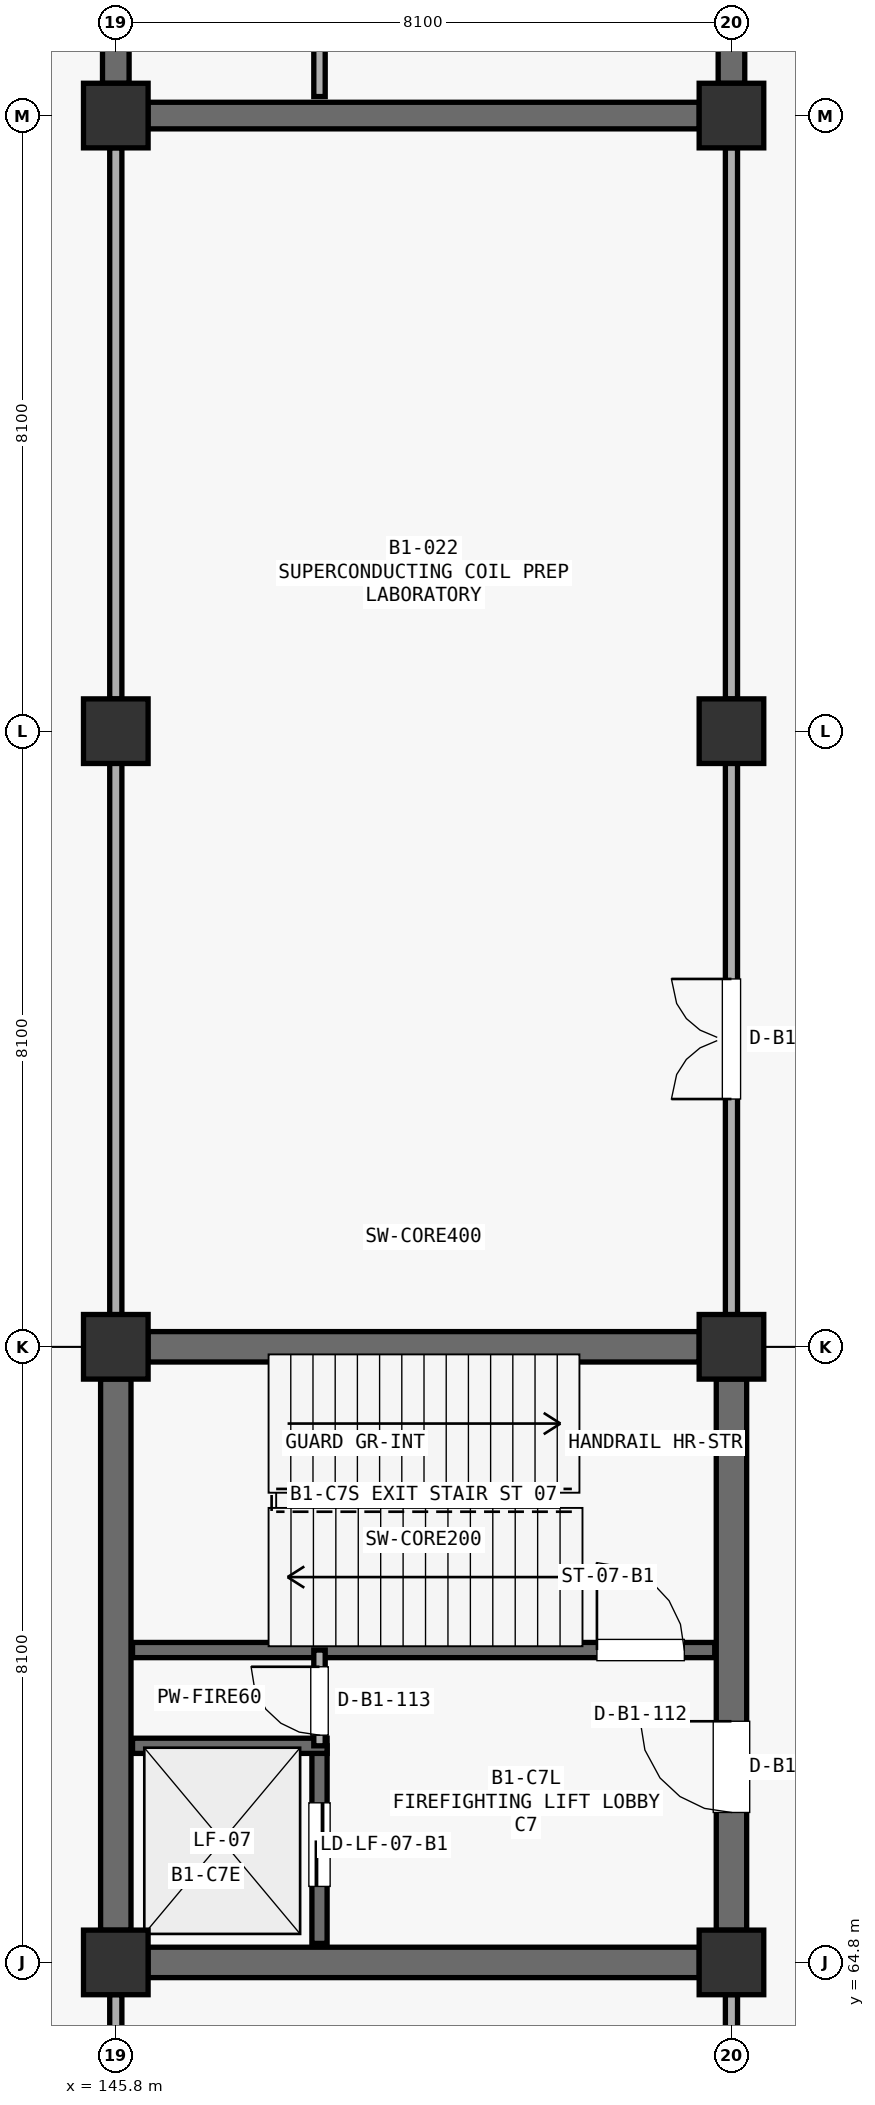
"""IFC4 building model, lengths in metres.
Left out: names, types, materials, properties, quantities, classifications, styles, units other than length and angle.
Written with IfcOpenShell. Run it as: python <this file> out.ifc"""

import sys

from ifc_helpers import new_model, si_unit, direction, frame, frame_2d, origin, origin_2d, place, context, subcontext, project, spatial, rectangle, extrude, element, fill, save


model = new_model("IFC4")
c1 = context("Model", 3, precision=1e-05, world=origin(), true_north=direction((0.0, 1.0)))
c2 = subcontext(c1, "Body", "Model", "MODEL_VIEW")
j1 = project(units=[si_unit("LENGTHUNIT", "METRE"), si_unit("PLANEANGLEUNIT", "RADIAN")], contexts=[c1])
p1 = place(None, origin())
s1 = spatial("IfcSite", under=j1, at=p1, CompositionType="ELEMENT")
p2 = place(p1, origin())
s2 = spatial("IfcBuilding", under=s1, at=p2, CompositionType="ELEMENT")
p3 = place(p2, frame((0.0, 0.0, -5.1)))
s3 = spatial("IfcBuildingStorey", under=s2, at=p3, CompositionType="ELEMENT", Elevation=-5.1)
for number, where, z_axis, x_axis in (
    (1, (145.8, 64.8, 0.0), (0.0, 0.0, 1.0), (1.0, 0.0, 0.0)),
    (2, (145.8, 72.9, 0.0), (0.0, 0.0, 1.0), (1.0, 0.0, 0.0)),
    (3, (145.8, 81.0, 0.0), (0.0, 0.0, 1.0), (1.0, 0.0, 0.0)),
    (4, (145.8, 89.1, 0.0), (0.0, 0.0, 1.0), (1.0, 0.0, 0.0)),
    (5, (153.9, 64.8, 0.0), (0.0, 0.0, 1.0), (1.0, 0.0, 0.0)),
    (6, (153.9, 72.9, 0.0), (0.0, 0.0, 1.0), (1.0, 0.0, 0.0)),
    (7, (153.9, 81.0, 0.0), (0.0, 0.0, 1.0), (1.0, 0.0, 0.0)),
    (8, (153.9, 89.1, 0.0), (0.0, 0.0, 1.0), (1.0, 0.0, 0.0)),
):
    element("IfcColumn", number, at=place(p3, frame(where, z_axis=z_axis, x_axis=x_axis)), inside=s3, PredefinedType="COLUMN", context=c2, shape_type="SweptSolid", body=[
        extrude(rectangle(XDim=0.85, YDim=0.85, at=origin_2d()), origin(), (0.0, 0.0, 1.0), 5.1),
    ])
for number, where, z_axis, x_axis in (
    (9, (146.223, 72.9, 0.0), (0.0, 0.0, 1.0), (1.0, 0.0, 0.0)),
    (10, (145.8, 65.223, 0.0), (0.0, 0.0, 1.0), (0.0, 1.0, 0.0)),
):
    element("IfcWall", number, at=place(p3, frame(where, z_axis=z_axis, x_axis=x_axis)), inside=s3, PredefinedType="SHEAR", context=c2, shape_type="SweptSolid", body=[
        extrude(rectangle(XDim=7.254, YDim=0.4, at=frame_2d((3.627, 0.0))), origin(), (0.0, 0.0, 1.0), 4.782),
    ])
p4 = place(p3, frame((153.9, 65.223, 0.0), z_axis=(0.0, 0.0, 1.0), x_axis=(0.0, 1.0, 0.0)))
e11 = element("IfcWall", 11, at=p4, inside=s3, PredefinedType="SHEAR", context=c2, shape_type="SweptSolid", body=[
    extrude(rectangle(XDim=7.254, YDim=0.4, at=frame_2d((3.627, 0.0))), origin(), (0.0, 0.0, 1.0), 4.782),
])
p5 = place(p4, frame((1.55, 0.0, 0.0)))
e12 = element("IfcOpeningElement", 12, at=p5, cuts=e11, PredefinedType="OPENING", context=c2, shape_type="SweptSolid", body=[
    extrude(rectangle(XDim=1.2, YDim=2.2, at=frame_2d((0.6, 1.1))), frame((0.0, 0.21, 0.0), z_axis=(0.0, -1.0, 0.0), x_axis=(1.0, 0.0, 0.0)), (0.0, 0.0, 1.0), 0.42),
])
p6 = place(p3, frame((146.223, 64.8, 0.0), z_axis=(0.0, 0.0, 1.0), x_axis=(1.0, 0.0, 0.0)))
e13 = element("IfcWall", 13, at=p6, inside=s3, PredefinedType="SHEAR", context=c2, shape_type="SweptSolid", body=[
    extrude(rectangle(XDim=7.254, YDim=0.4, at=frame_2d((3.627, 0.0))), origin(), (0.0, 0.0, 1.0), 4.782),
])
p7 = place(p3, frame((146.02, 68.91, 0.0), z_axis=(0.0, 0.0, 1.0), x_axis=(1.0, 0.0, 0.0)))
e14 = element("IfcWall", 14, at=p7, inside=s3, PredefinedType="SHEAR", context=c2, shape_type="SweptSolid", body=[
    extrude(rectangle(XDim=7.66, YDim=0.2, at=frame_2d((3.83, 0.0))), origin(), (0.0, 0.0, 1.0), 4.782),
])
p8 = place(p7, frame((6.11, 0.0, 0.0)))
e15 = element("IfcOpeningElement", 15, at=p8, cuts=e14, PredefinedType="OPENING", context=c2, shape_type="SweptSolid", body=[
    extrude(rectangle(XDim=1.15, YDim=2.2, at=frame_2d((0.575, 1.1))), frame((0.0, 0.11, 0.0), z_axis=(0.0, -1.0, 0.0), x_axis=(1.0, 0.0, 0.0)), (0.0, 0.0, 1.0), 0.22),
])
p9 = place(p3, frame((148.48, 65.05, 0.0), z_axis=(0.0, 0.0, 1.0), x_axis=(0.0, 1.0, 0.0)))
e16 = element("IfcWall", 16, at=p9, inside=s3, PredefinedType="SHEAR", context=c2, shape_type="SweptSolid", body=[
    extrude(rectangle(XDim=2.6, YDim=0.2, at=frame_2d((1.3, 0.0))), origin(), (0.0, 0.0, 1.0), 4.782),
])
p10 = place(p9, frame((0.75, 0.0, 0.0)))
e17 = element("IfcOpeningElement", 17, at=p10, cuts=e16, PredefinedType="OPENING", context=c2, shape_type="SweptSolid", body=[
    extrude(rectangle(XDim=1.1, YDim=2.2, at=frame_2d((0.55, 1.1))), frame((0.0, 0.11, 0.0), z_axis=(0.0, -1.0, 0.0), x_axis=(1.0, 0.0, 0.0)), (0.0, 0.0, 1.0), 0.22),
])
p11 = place(p3, frame((146.02, 67.65, 0.0), z_axis=(0.0, 0.0, 1.0), x_axis=(1.0, 0.0, 0.0)))
e18 = element("IfcWall", 18, at=p11, inside=s3, PredefinedType="SHEAR", context=c2, shape_type="SweptSolid", body=[
    extrude(rectangle(XDim=2.56, YDim=0.2, at=frame_2d((1.28, 0.0))), origin(), (0.0, 0.0, 1.0), 4.782),
])
p12 = place(p3, frame((148.48, 67.65, 0.0), z_axis=(0.0, 0.0, 1.0), x_axis=(0.0, 1.0, 0.0)))
e19 = element("IfcWall", 19, at=p12, inside=s3, PredefinedType="PARTITIONING", context=c2, shape_type="SweptSolid", body=[
    extrude(rectangle(XDim=1.26, YDim=0.15, at=frame_2d((0.63, 0.0))), origin(), (0.0, 0.0, 1.0), 4.782),
])
p13 = place(p12, frame((0.14, 0.0, 0.0)))
e20 = element("IfcOpeningElement", 20, at=p13, cuts=e19, PredefinedType="OPENING", context=c2, shape_type="SweptSolid", body=[
    extrude(rectangle(XDim=0.9, YDim=2.15, at=frame_2d((0.45, 1.075))), frame((0.0, 0.085, 0.0), z_axis=(0.0, -1.0, 0.0), x_axis=(1.0, 0.0, 0.0)), (0.0, 0.0, 1.0), 0.17),
])
p14 = place(p3, frame((145.8, 89.523, 0.0), z_axis=(0.0, 0.0, 1.0), x_axis=(0.0, 1.0, 0.0)))
e21 = element("IfcWall", 21, at=p14, inside=s3, PredefinedType="SHEAR", context=c2, shape_type="SweptSolid", body=[
    extrude(rectangle(XDim=7.254, YDim=0.35, at=frame_2d((3.627, 0.0))), origin(), (0.0, 0.0, 1.0), 4.782),
])
p15 = place(p3, frame((153.9, 89.523, 0.0), z_axis=(0.0, 0.0, 1.0), x_axis=(0.0, 1.0, 0.0)))
e22 = element("IfcWall", 22, at=p15, inside=s3, PredefinedType="SHEAR", context=c2, shape_type="SweptSolid", body=[
    extrude(rectangle(XDim=7.254, YDim=0.35, at=frame_2d((3.627, 0.0))), origin(), (0.0, 0.0, 1.0), 4.782),
])
p16 = place(p15, frame((1.55, 0.0, 0.0)))
e23 = element("IfcOpeningElement", 23, at=p16, cuts=e22, PredefinedType="OPENING", context=c2, shape_type="SweptSolid", body=[
    extrude(rectangle(XDim=1.2, YDim=2.2, at=frame_2d((0.6, 1.1))), frame((0.0, 0.185, 0.0), z_axis=(0.0, -1.0, 0.0), x_axis=(1.0, 0.0, 0.0)), (0.0, 0.0, 1.0), 0.37),
])
p17 = place(p3, frame((146.223, 89.1, 0.0), z_axis=(0.0, 0.0, 1.0), x_axis=(1.0, 0.0, 0.0)))
e24 = element("IfcWall", 24, at=p17, inside=s3, PredefinedType="SHEAR", context=c2, shape_type="SweptSolid", body=[
    extrude(rectangle(XDim=7.254, YDim=0.35, at=frame_2d((3.627, 0.0))), origin(), (0.0, 0.0, 1.0), 4.782),
])
p18 = place(p3, frame((148.48, 89.35, 0.0), z_axis=(0.0, 0.0, 1.0), x_axis=(0.0, 1.0, 0.0)))
e25 = element("IfcWall", 25, at=p18, inside=s3, PredefinedType="PARTITIONING", context=c2, shape_type="SweptSolid", body=[
    extrude(rectangle(XDim=2.6, YDim=0.15, at=frame_2d((1.3, 0.0))), origin(), (0.0, 0.0, 1.0), 4.782),
])
p19 = place(p18, frame((0.8, 0.0, 0.0)))
e26 = element("IfcOpeningElement", 26, at=p19, cuts=e25, PredefinedType="OPENING", context=c2, shape_type="SweptSolid", body=[
    extrude(rectangle(XDim=0.95, YDim=2.15, at=frame_2d((0.475, 1.075))), frame((0.0, 0.085, 0.0), z_axis=(0.0, -1.0, 0.0), x_axis=(1.0, 0.0, 0.0)), (0.0, 0.0, 1.0), 0.17),
])
p20 = place(p3, frame((145.8, 57.123, 0.0), z_axis=(0.0, 0.0, 1.0), x_axis=(0.0, 1.0, 0.0)))
e27 = element("IfcWall", 27, at=p20, inside=s3, PredefinedType="PARTITIONING", context=c2, shape_type="SweptSolid", body=[
    extrude(rectangle(XDim=7.254, YDim=0.16, at=frame_2d((3.627, 0.0))), origin(), (0.0, 0.0, 1.0), 3.932),
])
p21 = place(p20, frame((2.917, 0.0, 0.0)))
e28 = element("IfcOpeningElement", 28, at=p21, cuts=e27, PredefinedType="OPENING", context=c2, shape_type="SweptSolid", body=[
    extrude(rectangle(XDim=1.42, YDim=2.25, at=frame_2d((0.71, 1.125))), frame((0.0, 0.09, 0.0), z_axis=(0.0, -1.0, 0.0), x_axis=(1.0, 0.0, 0.0)), (0.0, 0.0, 1.0), 0.18),
])
p22 = place(p3, frame((145.8, 73.323, 0.0), z_axis=(0.0, 0.0, 1.0), x_axis=(0.0, 1.0, 0.0)))
e29 = element("IfcWall", 29, at=p22, inside=s3, PredefinedType="PARTITIONING", context=c2, shape_type="SweptSolid", body=[
    extrude(rectangle(XDim=7.254, YDim=0.16, at=frame_2d((3.627, 0.0))), origin(), (0.0, 0.0, 1.0), 4.032),
])
p23 = place(p3, frame((145.8, 81.423, 0.0), z_axis=(0.0, 0.0, 1.0), x_axis=(0.0, 1.0, 0.0)))
e30 = element("IfcWall", 30, at=p23, inside=s3, PredefinedType="PARTITIONING", context=c2, shape_type="SweptSolid", body=[
    extrude(rectangle(XDim=7.254, YDim=0.16, at=frame_2d((3.627, 0.0))), origin(), (0.0, 0.0, 1.0), 4.132),
])
p24 = place(p3, frame((153.9, 73.323, 0.0), z_axis=(0.0, 0.0, 1.0), x_axis=(0.0, 1.0, 0.0)))
e31 = element("IfcWall", 31, at=p24, inside=s3, PredefinedType="PARTITIONING", context=c2, shape_type="SweptSolid", body=[
    extrude(rectangle(XDim=7.254, YDim=0.16, at=frame_2d((3.627, 0.0))), origin(), (0.0, 0.0, 1.0), 4.182),
])
p25 = place(p24, frame((2.837, 0.0, 0.0)))
e32 = element("IfcOpeningElement", 32, at=p25, cuts=e31, PredefinedType="OPENING", context=c2, shape_type="SweptSolid", body=[
    extrude(rectangle(XDim=1.58, YDim=2.2, at=frame_2d((0.79, 1.1))), frame((0.0, 0.09, 0.0), z_axis=(0.0, -1.0, 0.0), x_axis=(1.0, 0.0, 0.0)), (0.0, 0.0, 1.0), 0.18),
])
p26 = place(p3, frame((153.9, 81.423, 0.0), z_axis=(0.0, 0.0, 1.0), x_axis=(0.0, 1.0, 0.0)))
e33 = element("IfcWall", 33, at=p26, inside=s3, PredefinedType="PARTITIONING", context=c2, shape_type="SweptSolid", body=[
    extrude(rectangle(XDim=7.254, YDim=0.16, at=frame_2d((3.627, 0.0))), origin(), (0.0, 0.0, 1.0), 3.932),
])
p27 = place(p3, frame((153.9, 57.123, 0.0), z_axis=(0.0, 0.0, 1.0), x_axis=(0.0, 1.0, 0.0)))
e34 = element("IfcWall", 34, at=p27, inside=s3, PredefinedType="PARTITIONING", context=c2, shape_type="SweptSolid", body=[
    extrude(rectangle(XDim=7.254, YDim=0.16, at=frame_2d((3.627, 0.0))), origin(), (0.0, 0.0, 1.0), 4.032),
])
p28 = place(p27, frame((2.877, 0.0, 0.0)))
e35 = element("IfcOpeningElement", 35, at=p28, cuts=e34, PredefinedType="OPENING", context=c2, shape_type="SweptSolid", body=[
    extrude(rectangle(XDim=1.5, YDim=2.2, at=frame_2d((0.75, 1.1))), frame((0.0, 0.09, 0.0), z_axis=(0.0, -1.0, 0.0), x_axis=(1.0, 0.0, 0.0)), (0.0, 0.0, 1.0), 0.18),
])
p29 = place(p5, origin())
e36 = element("IfcDoor", 36, at=p29, inside=s3, OperationType="SINGLE_SWING_RIGHT", PredefinedType="DOOR", context=c2, shape_type="SweptSolid", body=[
    extrude(rectangle(XDim=1.2, YDim=2.2, at=frame_2d((0.6, 1.1))), frame((0.0, 0.025, 0.0), z_axis=(0.0, -1.0, 0.0), x_axis=(1.0, 0.0, 0.0)), (0.0, 0.0, 1.0), 0.05),
])
fill(e12, e36)
p30 = place(p8, origin())
e37 = element("IfcDoor", 37, at=p30, inside=s3, OperationType="SINGLE_SWING_LEFT", PredefinedType="DOOR", context=c2, shape_type="SweptSolid", body=[
    extrude(rectangle(XDim=1.15, YDim=2.2, at=frame_2d((0.575, 1.1))), frame((0.0, 0.025, 0.0), z_axis=(0.0, -1.0, 0.0), x_axis=(1.0, 0.0, 0.0)), (0.0, 0.0, 1.0), 0.05),
])
fill(e15, e37)
p31 = place(p10, origin())
e38 = element("IfcDoor", 38, at=p31, inside=s3, OperationType="SLIDING_TO_LEFT", PredefinedType="DOOR", context=c2, shape_type="SweptSolid", body=[
    extrude(rectangle(XDim=1.1, YDim=2.2, at=frame_2d((0.55, 1.1))), frame((0.0, 0.025, 0.0), z_axis=(0.0, -1.0, 0.0), x_axis=(1.0, 0.0, 0.0)), (0.0, 0.0, 1.0), 0.05),
])
fill(e17, e38)
p32 = place(p13, origin())
e39 = element("IfcDoor", 39, at=p32, inside=s3, OperationType="SINGLE_SWING_RIGHT", PredefinedType="DOOR", context=c2, shape_type="SweptSolid", body=[
    extrude(rectangle(XDim=0.9, YDim=2.15, at=frame_2d((0.45, 1.075))), frame((0.0, 0.025, 0.0), z_axis=(0.0, -1.0, 0.0), x_axis=(1.0, 0.0, 0.0)), (0.0, 0.0, 1.0), 0.05),
])
fill(e20, e39)
p33 = place(p25, origin())
e40 = element("IfcDoor", 40, at=p33, inside=s3, OperationType="DOUBLE_SWING_LEFT", PredefinedType="DOOR", context=c2, shape_type="SweptSolid", body=[
    extrude(rectangle(XDim=1.58, YDim=2.2, at=frame_2d((0.79, 1.1))), frame((0.0, 0.025, 0.0), z_axis=(0.0, -1.0, 0.0), x_axis=(1.0, 0.0, 0.0)), (0.0, 0.0, 1.0), 0.05),
])
fill(e32, e40)
save(model, sys.argv[1])
